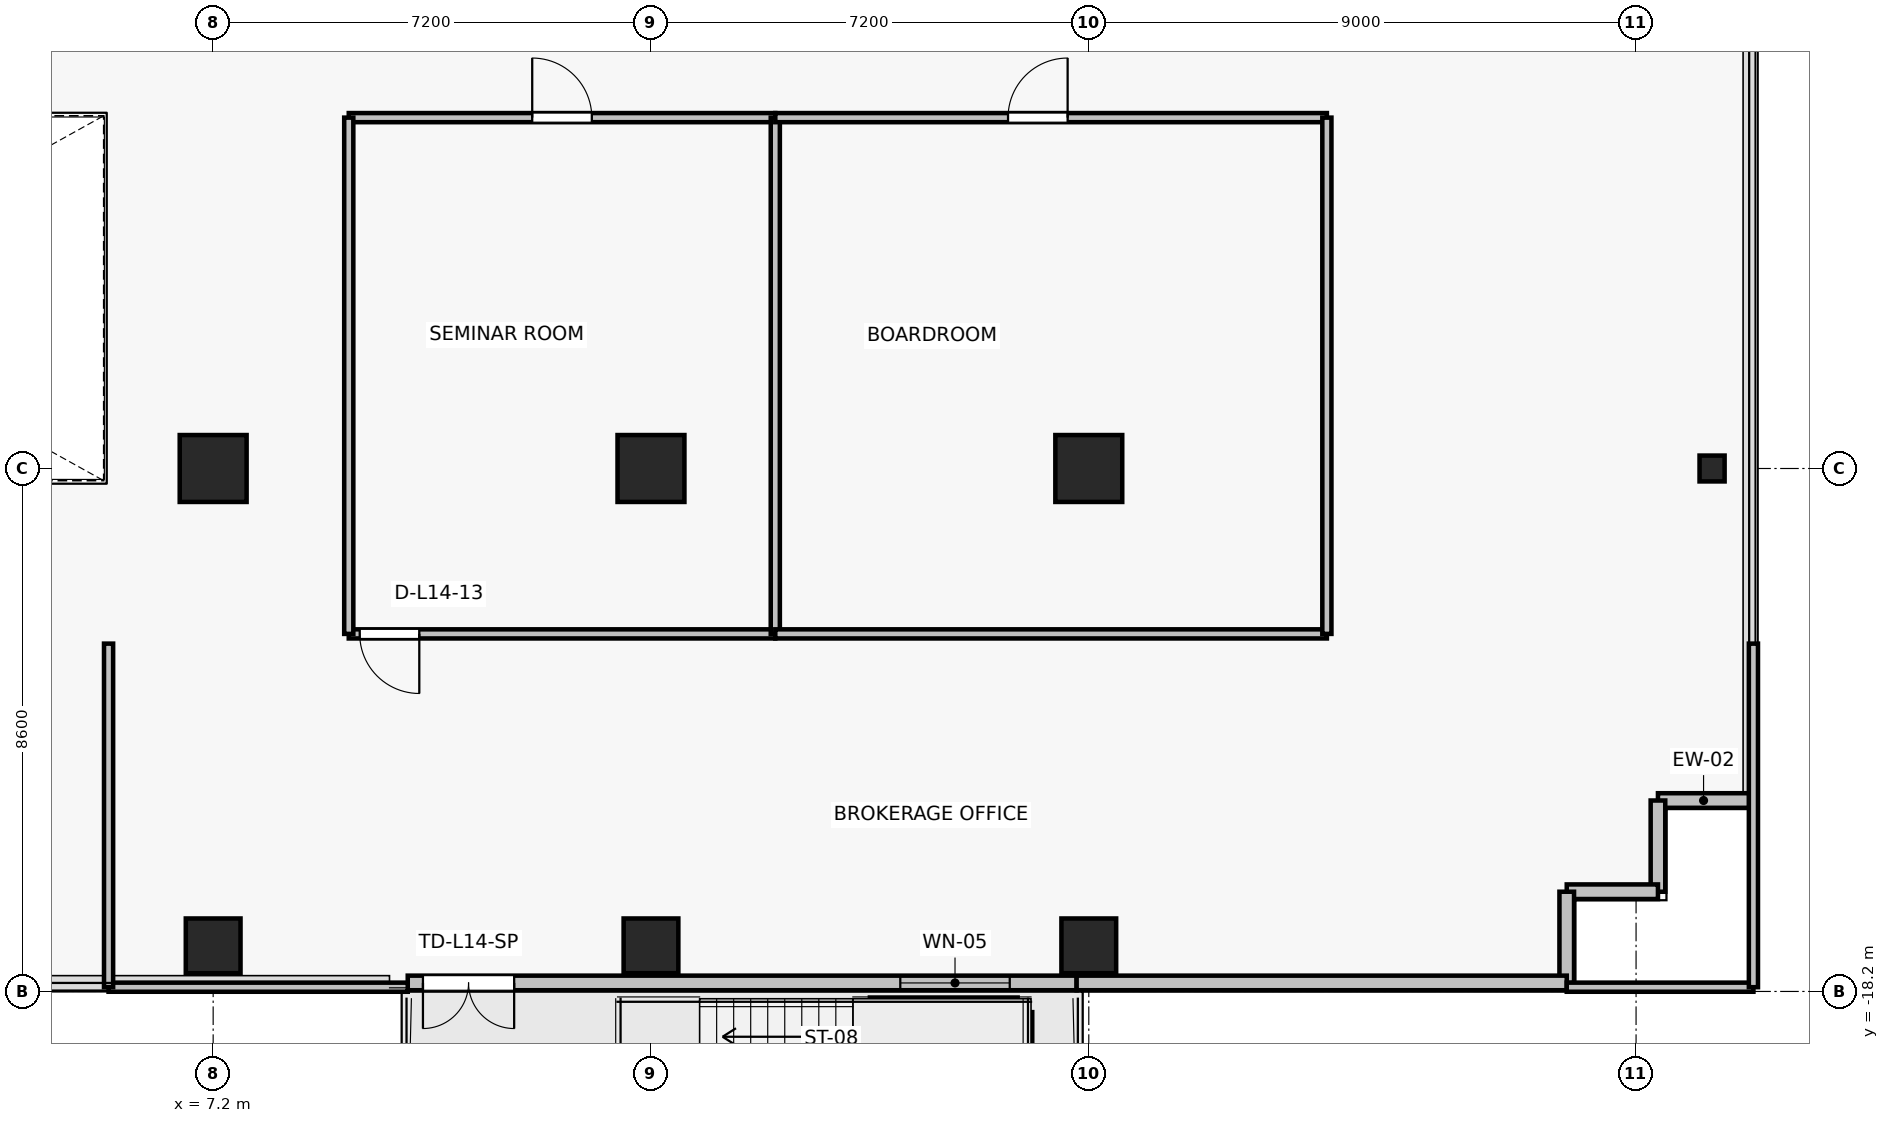
"""IFC4 building model, lengths in metres.
Left out: names, types, materials, properties, quantities, classifications, styles, units other than length and angle.
Written with IfcOpenShell. Run it as: python <this file> out.ifc"""

import sys

from ifc_helpers import new_model, si_unit, direction, frame, frame_2d, origin, origin_2d, place, context, subcontext, project, spatial, rectangle, i_section, extrude, source, transform, mapped, element, fill, save


model = new_model("IFC4")
c1 = context("Model", 3, precision=1e-05, world=origin(), true_north=direction((0.0, 1.0)))
c2 = subcontext(c1, "Body", "Model", "MODEL_VIEW")
j1 = project(units=[si_unit("LENGTHUNIT", "METRE"), si_unit("PLANEANGLEUNIT", "RADIAN")], contexts=[c1])
p1 = place(None, origin())
s1 = spatial("IfcSite", under=j1, at=p1, CompositionType="ELEMENT")
p2 = place(p1, origin())
s2 = spatial("IfcBuilding", under=s1, at=p2, CompositionType="ELEMENT")
p3 = place(p2, frame((0.0, 0.0, 53.8)))
s3 = spatial("IfcBuildingStorey", under=s2, at=p3, CompositionType="ELEMENT", Elevation=53.8)
for number, where, z_axis, x_axis in (
    (1, (7.2, -9.6, 0.0), (0.0, 0.0, 1.0), (1.0, 0.0, 0.0)),
    (2, (14.4, -9.6, 0.0), (0.0, 0.0, 1.0), (1.0, 0.0, 0.0)),
    (3, (21.6, -9.6, 0.0), (0.0, 0.0, 1.0), (1.0, 0.0, 0.0)),
):
    element("IfcColumn", number, at=place(p3, frame(where, z_axis=z_axis, x_axis=x_axis)), inside=s3, PredefinedType="COLUMN", context=c2, shape_type="SweptSolid", body=[
        extrude(rectangle(XDim=1.1, YDim=1.1, at=origin_2d()), origin(), (0.0, 0.0, 1.0), 3.3),
    ])
for number, where, z_axis, x_axis in (
    (4, (7.2, -17.45, 0.0), (0.0, 0.0, 1.0), (1.0, 0.0, 0.0)),
    (5, (14.4, -17.45, 0.0), (0.0, 0.0, 1.0), (1.0, 0.0, 0.0)),
    (6, (21.6, -17.45, 0.0), (0.0, 0.0, 1.0), (1.0, 0.0, 0.0)),
):
    element("IfcColumn", number, at=place(p3, frame(where, z_axis=z_axis, x_axis=x_axis)), inside=s3, PredefinedType="COLUMN", context=c2, shape_type="SweptSolid", body=[
        extrude(rectangle(XDim=0.9, YDim=0.9, at=origin_2d()), origin(), (0.0, 0.0, 1.0), 3.3),
    ])
p4 = place(p3, frame((31.85, -9.6, 0.0), z_axis=(0.0, 0.0, 1.0), x_axis=(1.0, 0.0, 0.0)))
e7 = element("IfcColumn", 7, at=p4, inside=s3, PredefinedType="COLUMN", context=c2, shape_type="SweptSolid", body=[
    extrude(i_section(OverallWidth=0.412, OverallDepth=0.425, WebThickness=0.026, FlangeThickness=0.039, FilletRadius=0.015, at=origin_2d()), origin(), (0.0, 0.0, 1.0), 3.3),
])
p5 = place(p3, frame((21.4, -18.06, 0.0), z_axis=(0.0, 0.0, 1.0), x_axis=(-1.0, 0.0, 0.0)))
e8 = element("IfcWall", 8, at=p5, inside=s3, PredefinedType="SOLIDWALL", context=c2, shape_type="SweptSolid", body=[
    extrude(rectangle(XDim=11.0, YDim=0.24, at=frame_2d((5.5, 0.0))), origin(), (0.0, 0.0, 1.0), 2.59),
])
p6 = place(p5, frame((9.25, 0.0, 0.0)))
e9 = element("IfcOpeningElement", 9, at=p6, cuts=e8, PredefinedType="OPENING", context=c2, shape_type="SweptSolid", body=[
    extrude(rectangle(XDim=1.5, YDim=2.2, at=frame_2d((0.75, 1.1))), frame((0.0, 0.13, 0.0), z_axis=(0.0, -1.0, 0.0), x_axis=(1.0, 0.0, 0.0)), (0.0, 0.0, 1.0), 0.26),
])
p7 = place(p5, frame((1.1, 0.0, 0.85)))
e10 = element("IfcOpeningElement", 10, at=p7, cuts=e8, PredefinedType="OPENING", context=c2, shape_type="SweptSolid", body=[
    extrude(rectangle(XDim=1.8, YDim=1.6, at=frame_2d((0.9, 0.8))), frame((0.0, 0.13, 0.0), z_axis=(0.0, -1.0, 0.0), x_axis=(1.0, 0.0, 0.0)), (0.0, 0.0, 1.0), 0.26),
])
for number, where, z_axis, x_axis in (
    (11, (30.96, -15.06, 0.0), (0.0, 0.0, 1.0), (1.0, 0.0, 0.0)),
    (12, (30.96, -16.56, 0.0), (0.0, 0.0, 1.0), (0.0, 1.0, 0.0)),
    (13, (29.46, -16.56, 0.0), (0.0, 0.0, 1.0), (1.0, 0.0, 0.0)),
    (14, (29.46, -18.06, 0.0), (0.0, 0.0, 1.0), (0.0, 1.0, 0.0)),
):
    element("IfcWall", number, at=place(p3, frame(where, z_axis=z_axis, x_axis=x_axis)), inside=s3, PredefinedType="SOLIDWALL", context=c2, shape_type="SweptSolid", body=[
        extrude(rectangle(XDim=1.5, YDim=0.24, at=frame_2d((0.75, 0.0))), origin(), (0.0, 0.0, 1.0), 3.075),
    ])
p8 = place(p3, frame((21.4, -18.06, 0.0), z_axis=(0.0, 0.0, 1.0), x_axis=(1.0, 0.0, 0.0)))
e15 = element("IfcWall", 15, at=p8, inside=s3, PredefinedType="SOLIDWALL", context=c2, shape_type="SweptSolid", body=[
    extrude(rectangle(XDim=8.06, YDim=0.24, at=frame_2d((4.03, 0.0))), origin(), (0.0, 0.0, 1.0), 3.075),
])
p9 = place(p3, frame((20.57, -20.72, -0.25), z_axis=(0.0, 0.0, 1.0), x_axis=(0.0, 1.0, 0.0)))
e16 = element("IfcWall", 16, at=p9, inside=s3, PredefinedType="SOLIDWALL", context=c2, shape_type="SweptSolid", body=[
    extrude(rectangle(XDim=2.18, YDim=0.2, at=frame_2d((1.09, 0.0))), origin(), (0.0, 0.0, 1.0), 1.7),
])
p10 = place(p3, frame((18.0, -18.4, -0.25), z_axis=(0.0, 0.0, 1.0), x_axis=(1.0, 0.0, 0.0)))
e17 = element("IfcWall", 17, at=p10, inside=s3, PredefinedType="SOLIDWALL", context=c2, shape_type="SweptSolid", body=[
    extrude(rectangle(XDim=2.43, YDim=0.2, at=frame_2d((1.215, 0.0))), origin(), (0.0, 0.0, 1.0), 1.7),
])
p11 = place(p3, frame((16.445, -12.32, 0.0), z_axis=(0.0, 0.0, 1.0), x_axis=(-1.0, 0.0, 0.0)))
e18 = element("IfcWall", 18, at=p11, inside=s3, PredefinedType="PARTITIONING", context=c2, shape_type="SweptSolid", body=[
    extrude(rectangle(XDim=7.015, YDim=0.15, at=frame_2d((3.507, 0.0))), origin(), (0.0, 0.0, 1.0), 2.465),
])
p12 = place(p11, frame((5.854, 0.0, 0.0)))
e19 = element("IfcOpeningElement", 19, at=p12, cuts=e18, PredefinedType="OPENING", context=c2, shape_type="SweptSolid", body=[
    extrude(rectangle(XDim=0.98, YDim=2.15, at=frame_2d((0.49, 1.075))), frame((0.0, 0.085, 0.0), z_axis=(0.0, -1.0, 0.0), x_axis=(1.0, 0.0, 0.0)), (0.0, 0.0, 1.0), 0.17),
])
p13 = place(p3, frame((9.43, -3.83, 0.0), z_axis=(0.0, 0.0, 1.0), x_axis=(1.0, 0.0, 0.0)))
e20 = element("IfcWall", 20, at=p13, inside=s3, PredefinedType="PARTITIONING", context=c2, shape_type="SweptSolid", body=[
    extrude(rectangle(XDim=7.015, YDim=0.15, at=frame_2d((3.507, 0.0))), origin(), (0.0, 0.0, 1.0), 2.465),
])
p14 = place(p13, frame((3.017, 0.0, 0.0)))
e21 = element("IfcOpeningElement", 21, at=p14, cuts=e20, PredefinedType="OPENING", context=c2, shape_type="SweptSolid", body=[
    extrude(rectangle(XDim=0.98, YDim=2.15, at=frame_2d((0.49, 1.075))), frame((0.0, 0.085, 0.0), z_axis=(0.0, -1.0, 0.0), x_axis=(1.0, 0.0, 0.0)), (0.0, 0.0, 1.0), 0.17),
])
for number, where, z_axis, x_axis in (
    (22, (9.43, -12.32, 0.0), (0.0, 0.0, 1.0), (0.0, 1.0, 0.0)),
    (23, (16.445, -3.83, 0.0), (0.0, 0.0, 1.0), (0.0, -1.0, 0.0)),
):
    element("IfcWall", number, at=place(p3, frame(where, z_axis=z_axis, x_axis=x_axis)), inside=s3, PredefinedType="PARTITIONING", context=c2, shape_type="SweptSolid", body=[
        extrude(rectangle(XDim=8.49, YDim=0.15, at=frame_2d((4.245, 0.0))), origin(), (0.0, 0.0, 1.0), 2.465),
    ])
p15 = place(p3, frame((25.515, -12.32, 0.0), z_axis=(0.0, 0.0, 1.0), x_axis=(-1.0, 0.0, 0.0)))
e24 = element("IfcWall", 24, at=p15, inside=s3, PredefinedType="PARTITIONING", context=c2, shape_type="SweptSolid", body=[
    extrude(rectangle(XDim=9.071, YDim=0.15, at=frame_2d((4.535, 0.0))), origin(), (0.0, 0.0, 1.0), 2.465),
])
p16 = place(p3, frame((16.445, -3.83, 0.0), z_axis=(0.0, 0.0, 1.0), x_axis=(1.0, 0.0, 0.0)))
e25 = element("IfcWall", 25, at=p16, inside=s3, PredefinedType="PARTITIONING", context=c2, shape_type="SweptSolid", body=[
    extrude(rectangle(XDim=9.071, YDim=0.15, at=frame_2d((4.535, 0.0))), origin(), (0.0, 0.0, 1.0), 2.465),
])
p17 = place(p16, frame((3.827, 0.0, 0.0)))
e26 = element("IfcOpeningElement", 26, at=p17, cuts=e25, PredefinedType="OPENING", context=c2, shape_type="SweptSolid", body=[
    extrude(rectangle(XDim=0.98, YDim=2.15, at=frame_2d((0.49, 1.075))), frame((0.0, 0.085, 0.0), z_axis=(0.0, -1.0, 0.0), x_axis=(1.0, 0.0, 0.0)), (0.0, 0.0, 1.0), 0.17),
])
p18 = place(p3, frame((25.515, -3.83, 0.0), z_axis=(0.0, 0.0, 1.0), x_axis=(0.0, -1.0, 0.0)))
e27 = element("IfcWall", 27, at=p18, inside=s3, PredefinedType="PARTITIONING", context=c2, shape_type="SweptSolid", body=[
    extrude(rectangle(XDim=8.49, YDim=0.15, at=frame_2d((4.245, 0.0))), origin(), (0.0, 0.0, 1.0), 2.465),
])
p19 = place(p3, frame((10.4, -18.13, 0.0), z_axis=(0.0, 0.0, 1.0), x_axis=(-1.0, 0.0, 0.0)))
e28 = element("IfcWall", 28, at=p19, inside=s3, PredefinedType="PARTITIONING", context=c2, shape_type="SweptSolid", body=[
    extrude(rectangle(XDim=4.92, YDim=0.15, at=frame_2d((2.46, 0.0))), origin(), (0.0, 0.0, 1.0), 2.59),
])
p20 = place(p3, frame((32.53, -18.13, 0.0), z_axis=(0.0, 0.0, 1.0), x_axis=(-1.0, 0.0, 0.0)))
e29 = element("IfcWall", 29, at=p20, inside=s3, PredefinedType="PARTITIONING", context=c2, shape_type="SweptSolid", body=[
    extrude(rectangle(XDim=3.07, YDim=0.15, at=frame_2d((1.535, 0.0))), origin(), (0.0, 0.0, 1.0), 3.075),
])
p21 = place(p3, frame((5.48, -18.13, 0.0), z_axis=(0.0, 0.0, 1.0), x_axis=(0.0, 1.0, 0.0)))
e30 = element("IfcWall", 30, at=p21, inside=s3, PredefinedType="PARTITIONING", context=c2, shape_type="SweptSolid", body=[
    extrude(rectangle(XDim=5.65, YDim=0.15, at=frame_2d((2.825, 0.0))), origin(), (0.0, 0.0, 1.0), 2.465),
])
p22 = place(p3, frame((32.53, -12.48, 0.0), z_axis=(0.0, 0.0, 1.0), x_axis=(0.0, -1.0, 0.0)))
e31 = element("IfcWall", 31, at=p22, inside=s3, PredefinedType="PARTITIONING", context=c2, shape_type="SweptSolid", body=[
    extrude(rectangle(XDim=5.65, YDim=0.15, at=frame_2d((2.825, 0.0))), origin(), (0.0, 0.0, 1.0), 3.075),
])
m1 = source(origin(), c2, "Body", "SweptSolid", [
    extrude(rectangle(XDim=1.5, YDim=2.2, at=frame_2d((0.75, 1.1))), frame((0.0, 0.025, 0.0), z_axis=(0.0, -1.0, 0.0), x_axis=(1.0, 0.0, 0.0)), (0.0, 0.0, 1.0), 0.05),
])
p23 = place(p6, origin())
e32 = element("IfcDoor", 32, at=p23, inside=s3, OperationType="DOUBLE_DOOR_SINGLE_SWING", PredefinedType="DOOR", context=c2, shape_type="MappedRepresentation", body=[
    mapped(m1, transform((0.0, 0.0, 0.0), x_axis=(1.0, 0.0, 0.0), y_axis=(0.0, 1.0, 0.0), z_axis=(0.0, 0.0, 1.0), scale=1.0)),
])
fill(e9, e32)
m2 = source(origin(), c2, "Body", "SweptSolid", [
    extrude(rectangle(XDim=1.8, YDim=1.6, at=frame_2d((0.9, 0.8))), frame((0.0, 0.03, 0.0), z_axis=(0.0, -1.0, 0.0), x_axis=(1.0, 0.0, 0.0)), (0.0, 0.0, 1.0), 0.06),
])
p24 = place(p7, origin())
e33 = element("IfcWindow", 33, at=p24, inside=s3, PartitioningType="SINGLE_PANEL", PredefinedType="WINDOW", context=c2, shape_type="MappedRepresentation", body=[
    mapped(m2, transform((0.0, 0.0, 0.0), x_axis=(1.0, 0.0, 0.0), y_axis=(0.0, 1.0, 0.0), z_axis=(0.0, 0.0, 1.0), scale=1.0)),
])
fill(e10, e33)
m3 = source(origin(), c2, "Body", "SweptSolid", [
    extrude(rectangle(XDim=0.98, YDim=2.15, at=frame_2d((0.49, 1.075))), frame((0.0, 0.025, 0.0), z_axis=(0.0, -1.0, 0.0), x_axis=(1.0, 0.0, 0.0)), (0.0, 0.0, 1.0), 0.05),
])
p25 = place(p14, origin())
e34 = element("IfcDoor", 34, at=p25, inside=s3, OperationType="SINGLE_SWING_LEFT", PredefinedType="DOOR", context=c2, shape_type="MappedRepresentation", body=[
    mapped(m3, transform((0.0, 0.0, 0.0), x_axis=(1.0, 0.0, 0.0), y_axis=(0.0, 1.0, 0.0), z_axis=(0.0, 0.0, 1.0), scale=1.0)),
])
fill(e21, e34)
p26 = place(p17, origin())
e35 = element("IfcDoor", 35, at=p26, inside=s3, OperationType="SINGLE_SWING_RIGHT", PredefinedType="DOOR", context=c2, shape_type="MappedRepresentation", body=[
    mapped(m3, transform((0.0, 0.0, 0.0), x_axis=(1.0, 0.0, 0.0), y_axis=(0.0, 1.0, 0.0), z_axis=(0.0, 0.0, 1.0), scale=1.0)),
])
fill(e26, e35)
p27 = place(p12, origin())
e36 = element("IfcDoor", 36, at=p27, inside=s3, OperationType="SINGLE_SWING_LEFT", PredefinedType="DOOR", context=c2, shape_type="MappedRepresentation", body=[
    mapped(m3, transform((0.0, 0.0, 0.0), x_axis=(1.0, 0.0, 0.0), y_axis=(0.0, 1.0, 0.0), z_axis=(0.0, 0.0, 1.0), scale=1.0)),
])
fill(e19, e36)
save(model, sys.argv[1])
